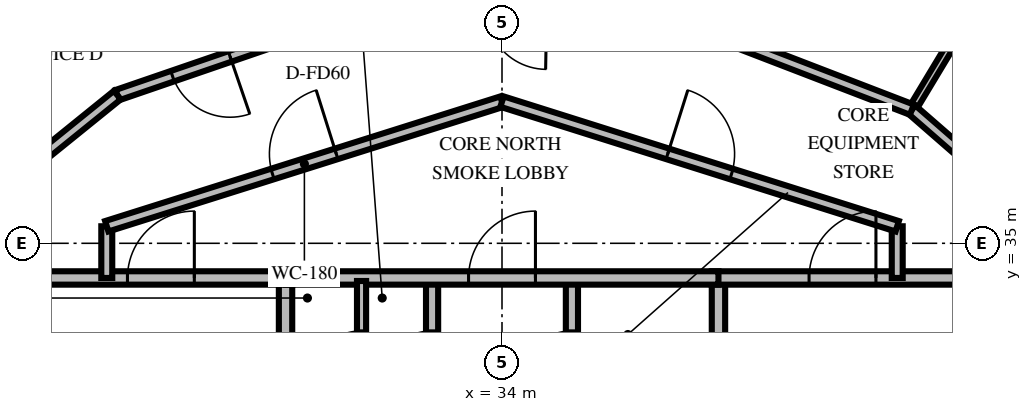
"""IFC4 building model, lengths in metres.
Left out: names, types, materials, properties, quantities, classifications, styles, units other than length and angle.
Written with IfcOpenShell. Run it as: python <this file> out.ifc"""

import sys

from ifc_helpers import new_model, si_unit, direction, frame, frame_2d, origin, place, context, subcontext, project, spatial, rectangle, extrude, element, fill, save


model = new_model("IFC4")
c1 = context("Model", 3, precision=1e-05, world=origin(), true_north=direction((0.0, 1.0)))
c2 = subcontext(c1, "Body", "Model", "MODEL_VIEW")
j1 = project(units=[si_unit("LENGTHUNIT", "METRE"), si_unit("PLANEANGLEUNIT", "RADIAN")], contexts=[c1])
p1 = place(None, origin())
s1 = spatial("IfcSite", under=j1, at=p1, CompositionType="ELEMENT")
p2 = place(p1, origin())
s2 = spatial("IfcBuilding", under=s1, at=p2, CompositionType="ELEMENT")
p3 = place(p2, frame((0.0, 0.0, 195.2)))
s3 = spatial("IfcBuildingStorey", under=s2, at=p3, CompositionType="ELEMENT", Elevation=195.2)
p4 = place(p3, frame((30.44, 30.05, 0.0), z_axis=(0.0, 0.0, 1.0), x_axis=(0.0, 1.0, 0.0)))
e1 = element("IfcWall", 1, at=p4, inside=s3, PredefinedType="SOLIDWALL", context=c2, shape_type="SweptSolid", body=[
    extrude(rectangle(XDim=4.38, YDim=0.22, at=frame_2d((2.19, 0.0))), origin(), (0.0, 0.0, 1.0), 2.46),
])
p5 = place(p4, frame((0.8, 0.0, 0.0)))
e2 = element("IfcOpeningElement", 2, at=p5, cuts=e1, PredefinedType="OPENING", context=c2, shape_type="SweptSolid", body=[
    extrude(rectangle(XDim=1.05, YDim=2.1, at=frame_2d((0.525, 1.05))), frame((0.0, 0.12, 0.0), z_axis=(0.0, -1.0, 0.0), x_axis=(1.0, 0.0, 0.0)), (0.0, 0.0, 1.0), 0.24),
])
p6 = place(p3, frame((26.24, 34.43, 0.0), z_axis=(0.0, 0.0, 1.0), x_axis=(1.0, 0.0, 0.0)))
e3 = element("IfcWall", 3, at=p6, inside=s3, PredefinedType="SOLIDWALL", context=c2, shape_type="SweptSolid", body=[
    extrude(rectangle(XDim=4.31, YDim=0.22, at=frame_2d((2.155, 0.0))), origin(), (0.0, 0.0, 1.0), 2.46),
])
p7 = place(p6, frame((1.6, 0.0, 0.0)))
e4 = element("IfcOpeningElement", 4, at=p7, cuts=e3, PredefinedType="OPENING", context=c2, shape_type="SweptSolid", body=[
    extrude(rectangle(XDim=1.1, YDim=2.15, at=frame_2d((0.55, 1.075))), frame((0.0, 0.12, 0.0), z_axis=(0.0, -1.0, 0.0), x_axis=(1.0, 0.0, 0.0)), (0.0, 0.0, 1.0), 0.24),
])
p8 = place(p3, frame((32.85, 30.05, 0.0), z_axis=(0.0, 0.0, 1.0), x_axis=(0.0, 1.0, 0.0)))
e5 = element("IfcWall", 5, at=p8, inside=s3, PredefinedType="SOLIDWALL", context=c2, shape_type="SweptSolid", body=[
    extrude(rectangle(XDim=4.38, YDim=0.2, at=frame_2d((2.19, 0.0))), origin(), (0.0, 0.0, 1.0), 2.46),
])
p9 = place(p8, frame((2.65, 0.0, 0.0)))
e6 = element("IfcOpeningElement", 6, at=p9, cuts=e5, PredefinedType="OPENING", context=c2, shape_type="SweptSolid", body=[
    extrude(rectangle(XDim=0.86, YDim=2.05, at=frame_2d((0.43, 1.025))), frame((0.0, 0.11, 0.0), z_axis=(0.0, -1.0, 0.0), x_axis=(1.0, 0.0, 0.0)), (0.0, 0.0, 1.0), 0.22),
])
p10 = place(p3, frame((37.56, 30.05, 0.0), z_axis=(0.0, 0.0, 1.0), x_axis=(0.0, 1.0, 0.0)))
e7 = element("IfcWall", 7, at=p10, inside=s3, PredefinedType="SOLIDWALL", context=c2, shape_type="SweptSolid", body=[
    extrude(rectangle(XDim=4.38, YDim=0.22, at=frame_2d((2.19, 0.0))), origin(), (0.0, 0.0, 1.0), 2.46),
])
p11 = place(p10, frame((0.8, 0.0, 0.0)))
e8 = element("IfcOpeningElement", 8, at=p11, cuts=e7, PredefinedType="OPENING", context=c2, shape_type="SweptSolid", body=[
    extrude(rectangle(XDim=1.05, YDim=2.1, at=frame_2d((0.525, 1.05))), frame((0.0, 0.12, 0.0), z_axis=(0.0, -1.0, 0.0), x_axis=(1.0, 0.0, 0.0)), (0.0, 0.0, 1.0), 0.24),
])
p12 = place(p3, frame((37.45, 34.43, 0.0), z_axis=(0.0, 0.0, 1.0), x_axis=(1.0, 0.0, 0.0)))
e9 = element("IfcWall", 9, at=p12, inside=s3, PredefinedType="SOLIDWALL", context=c2, shape_type="SweptSolid", body=[
    extrude(rectangle(XDim=4.31, YDim=0.22, at=frame_2d((2.155, 0.0))), origin(), (0.0, 0.0, 1.0), 2.46),
])
p13 = place(p12, frame((1.6, 0.0, 0.0)))
e10 = element("IfcOpeningElement", 10, at=p13, cuts=e9, PredefinedType="OPENING", context=c2, shape_type="SweptSolid", body=[
    extrude(rectangle(XDim=1.1, YDim=2.15, at=frame_2d((0.55, 1.075))), frame((0.0, 0.12, 0.0), z_axis=(0.0, -1.0, 0.0), x_axis=(1.0, 0.0, 0.0)), (0.0, 0.0, 1.0), 0.24),
])
p14 = place(p3, frame((35.15, 30.05, 0.0), z_axis=(0.0, 0.0, 1.0), x_axis=(0.0, 1.0, 0.0)))
e11 = element("IfcWall", 11, at=p14, inside=s3, PredefinedType="SOLIDWALL", context=c2, shape_type="SweptSolid", body=[
    extrude(rectangle(XDim=4.38, YDim=0.2, at=frame_2d((2.19, 0.0))), origin(), (0.0, 0.0, 1.0), 2.46),
])
p15 = place(p14, frame((2.65, 0.0, 0.0)))
e12 = element("IfcOpeningElement", 12, at=p15, cuts=e11, PredefinedType="OPENING", context=c2, shape_type="SweptSolid", body=[
    extrude(rectangle(XDim=0.86, YDim=2.05, at=frame_2d((0.43, 1.025))), frame((0.0, 0.11, 0.0), z_axis=(0.0, -1.0, 0.0), x_axis=(1.0, 0.0, 0.0)), (0.0, 0.0, 1.0), 0.22),
])
p16 = place(p3, frame((30.44, 34.43, 0.0), z_axis=(0.0, 0.0, 1.0), x_axis=(1.0, 0.0, 0.0)))
e13 = element("IfcWall", 13, at=p16, inside=s3, PredefinedType="SOLIDWALL", context=c2, shape_type="SweptSolid", body=[
    extrude(rectangle(XDim=7.12, YDim=0.22, at=frame_2d((3.56, 0.0))), origin(), (0.0, 0.0, 1.0), 2.46),
])
p17 = place(p16, frame((3.01, 0.0, 0.0)))
e14 = element("IfcOpeningElement", 14, at=p17, cuts=e13, PredefinedType="OPENING", context=c2, shape_type="SweptSolid", body=[
    extrude(rectangle(XDim=1.1, YDim=2.15, at=frame_2d((0.55, 1.075))), frame((0.0, 0.12, 0.0), z_axis=(0.0, -1.0, 0.0), x_axis=(1.0, 0.0, 0.0)), (0.0, 0.0, 1.0), 0.24),
])
p18 = place(p3, frame((31.69, 32.05, 0.0), z_axis=(0.0, 0.0, 1.0), x_axis=(0.0, 1.0, 0.0)))
e15 = element("IfcWall", 15, at=p18, inside=s3, PredefinedType="PARTITIONING", context=c2, shape_type="SweptSolid", body=[
    extrude(rectangle(XDim=2.33, YDim=0.15, at=frame_2d((1.165, 0.0))), origin(), (0.0, 0.0, 1.0), 2.46),
])
p19 = place(p18, frame((0.65, 0.0, 0.0)))
e16 = element("IfcOpeningElement", 16, at=p19, cuts=e15, PredefinedType="OPENING", context=c2, shape_type="SweptSolid", body=[
    extrude(rectangle(XDim=0.86, YDim=2.05, at=frame_2d((0.43, 1.025))), frame((0.0, 0.085, 0.0), z_axis=(0.0, -1.0, 0.0), x_axis=(1.0, 0.0, 0.0)), (0.0, 0.0, 1.0), 0.17),
])
for number, where, z_axis, x_axis in (
    (17, (27.5, 34.43, 0.0), (0.0, 0.0, 1.0), (0.0, 1.0, 0.0)),
    (18, (40.5, 35.28, 0.0), (0.0, 0.0, 1.0), (0.0, -1.0, 0.0)),
):
    element("IfcWall", number, at=place(p3, frame(where, z_axis=z_axis, x_axis=x_axis)), inside=s3, PredefinedType="PARTITIONING", context=c2, shape_type="SweptSolid", body=[
        extrude(rectangle(XDim=0.85, YDim=0.18, at=frame_2d((0.425, 0.0))), origin(), (0.0, 0.0, 1.0), 2.46),
    ])
p20 = place(p3, frame((27.5, 35.28, 0.0), z_axis=(0.0, 0.0, 1.0), x_axis=(0.953691418528, 0.300786765376, 0.0)))
e19 = element("IfcWall", 19, at=p20, inside=s3, PredefinedType="PARTITIONING", context=c2, shape_type="SweptSolid", body=[
    extrude(rectangle(XDim=6.816, YDim=0.18, at=frame_2d((3.408, 0.0))), origin(), (0.0, 0.0, 1.0), 2.46),
])
p21 = place(p20, frame((2.858, 0.0, 0.0)))
e20 = element("IfcOpeningElement", 20, at=p21, cuts=e19, PredefinedType="OPENING", context=c2, shape_type="SweptSolid", body=[
    extrude(rectangle(XDim=1.1, YDim=2.15, at=frame_2d((0.55, 1.075))), frame((0.0, 0.1, 0.0), z_axis=(0.0, -1.0, 0.0), x_axis=(1.0, 0.0, 0.0)), (0.0, 0.0, 1.0), 0.2),
])
p22 = place(p3, frame((34.0, 37.33, 0.0), z_axis=(0.0, 0.0, 1.0), x_axis=(0.953691418528, -0.300786765376, 0.0)))
e21 = element("IfcWall", 21, at=p22, inside=s3, PredefinedType="PARTITIONING", context=c2, shape_type="SweptSolid", body=[
    extrude(rectangle(XDim=6.816, YDim=0.18, at=frame_2d((3.408, 0.0))), origin(), (0.0, 0.0, 1.0), 2.46),
])
p23 = place(p22, frame((2.858, 0.0, 0.0)))
e22 = element("IfcOpeningElement", 22, at=p23, cuts=e21, PredefinedType="OPENING", context=c2, shape_type="SweptSolid", body=[
    extrude(rectangle(XDim=1.1, YDim=2.15, at=frame_2d((0.55, 1.075))), frame((0.0, 0.1, 0.0), z_axis=(0.0, -1.0, 0.0), x_axis=(1.0, 0.0, 0.0)), (0.0, 0.0, 1.0), 0.2),
])
p24 = place(p3, frame((40.741, 37.197, 0.0), z_axis=(0.0, 0.0, 1.0), x_axis=(0.515795335876, 0.856711836903, 0.0)))
e23 = element("IfcWall", 23, at=p24, inside=s3, PredefinedType="PARTITIONING", context=c2, shape_type="SweptSolid", body=[
    extrude(rectangle(XDim=9.417, YDim=0.125, at=frame_2d((4.708, 0.0))), origin(), (0.0, 0.0, 1.0), 2.46),
])
p25 = place(p3, frame((44.165, 34.216, 0.0), z_axis=(0.0, 0.0, 1.0), x_axis=(-0.754153769573, 0.656697869525, 0.0)))
e24 = element("IfcWall", 24, at=p25, inside=s3, PredefinedType="PARTITIONING", context=c2, shape_type="SweptSolid", body=[
    extrude(rectangle(XDim=4.539, YDim=0.18, at=frame_2d((2.27, 0.0))), origin(), (0.0, 0.0, 1.0), 2.46),
])
p26 = place(p25, frame((0.96, 0.0, 0.0)))
e25 = element("IfcOpeningElement", 25, at=p26, cuts=e24, PredefinedType="OPENING", context=c2, shape_type="SweptSolid", body=[
    extrude(rectangle(XDim=1.0, YDim=2.15, at=frame_2d((0.5, 1.075))), frame((0.0, 0.1, 0.0), z_axis=(0.0, -1.0, 0.0), x_axis=(1.0, 0.0, 0.0)), (0.0, 0.0, 1.0), 0.2),
])
p27 = place(p3, frame((40.741, 37.197, 0.0), z_axis=(0.0, 0.0, 1.0), x_axis=(-0.93326379198, 0.359191723984, 0.0)))
e26 = element("IfcWall", 26, at=p27, inside=s3, PredefinedType="PARTITIONING", context=c2, shape_type="SweptSolid", body=[
    extrude(rectangle(XDim=4.539, YDim=0.18, at=frame_2d((2.27, 0.0))), origin(), (0.0, 0.0, 1.0), 2.46),
])
p28 = place(p3, frame((31.967, 38.911, 0.0), z_axis=(0.0, 0.0, 1.0), x_axis=(-0.945799700753, -0.324750559747, 0.0)))
e27 = element("IfcWall", 27, at=p28, inside=s3, PredefinedType="PARTITIONING", context=c2, shape_type="SweptSolid", body=[
    extrude(rectangle(XDim=4.539, YDim=0.18, at=frame_2d((2.27, 0.0))), origin(), (0.0, 0.0, 1.0), 2.46),
])
p29 = place(p28, frame((2.579, 0.0, 0.0)))
e28 = element("IfcOpeningElement", 28, at=p29, cuts=e27, PredefinedType="OPENING", context=c2, shape_type="SweptSolid", body=[
    extrude(rectangle(XDim=1.0, YDim=2.15, at=frame_2d((0.5, 1.075))), frame((0.0, 0.1, 0.0), z_axis=(0.0, -1.0, 0.0), x_axis=(1.0, 0.0, 0.0)), (0.0, 0.0, 1.0), 0.2),
])
p30 = place(p3, frame((27.674, 37.437, 0.0), z_axis=(0.0, 0.0, 1.0), x_axis=(-0.777710585506, -0.62862249816, 0.0)))
e29 = element("IfcWall", 29, at=p30, inside=s3, PredefinedType="PARTITIONING", context=c2, shape_type="SweptSolid", body=[
    extrude(rectangle(XDim=4.539, YDim=0.18, at=frame_2d((2.27, 0.0))), origin(), (0.0, 0.0, 1.0), 2.46),
])
p31 = place(p7, origin())
e30 = element("IfcDoor", 30, at=p31, inside=s3, OperationType="SINGLE_SWING_RIGHT", PredefinedType="DOOR", context=c2, shape_type="SweptSolid", body=[
    extrude(rectangle(XDim=1.1, YDim=2.15, at=frame_2d((0.55, 1.075))), frame((0.0, 0.025, 0.0), z_axis=(0.0, -1.0, 0.0), x_axis=(1.0, 0.0, 0.0)), (0.0, 0.0, 1.0), 0.05),
])
fill(e4, e30)
p32 = place(p9, origin())
e31 = element("IfcDoor", 31, at=p32, inside=s3, OperationType="SINGLE_SWING_LEFT", PredefinedType="TRAPDOOR", context=c2, shape_type="SweptSolid", body=[
    extrude(rectangle(XDim=0.86, YDim=2.05, at=frame_2d((0.43, 1.025))), frame((0.0, 0.025, 0.0), z_axis=(0.0, -1.0, 0.0), x_axis=(1.0, 0.0, 0.0)), (0.0, 0.0, 1.0), 0.05),
])
fill(e6, e31)
p33 = place(p13, origin())
e32 = element("IfcDoor", 32, at=p33, inside=s3, OperationType="SINGLE_SWING_RIGHT", PredefinedType="DOOR", context=c2, shape_type="SweptSolid", body=[
    extrude(rectangle(XDim=1.1, YDim=2.15, at=frame_2d((0.55, 1.075))), frame((0.0, 0.025, 0.0), z_axis=(0.0, -1.0, 0.0), x_axis=(1.0, 0.0, 0.0)), (0.0, 0.0, 1.0), 0.05),
])
fill(e10, e32)
p34 = place(p15, origin())
e33 = element("IfcDoor", 33, at=p34, inside=s3, OperationType="SINGLE_SWING_LEFT", PredefinedType="TRAPDOOR", context=c2, shape_type="SweptSolid", body=[
    extrude(rectangle(XDim=0.86, YDim=2.05, at=frame_2d((0.43, 1.025))), frame((0.0, 0.025, 0.0), z_axis=(0.0, -1.0, 0.0), x_axis=(1.0, 0.0, 0.0)), (0.0, 0.0, 1.0), 0.05),
])
fill(e12, e33)
p35 = place(p17, origin())
e34 = element("IfcDoor", 34, at=p35, inside=s3, OperationType="SINGLE_SWING_RIGHT", PredefinedType="DOOR", context=c2, shape_type="SweptSolid", body=[
    extrude(rectangle(XDim=1.1, YDim=2.15, at=frame_2d((0.55, 1.075))), frame((0.0, 0.025, 0.0), z_axis=(0.0, -1.0, 0.0), x_axis=(1.0, 0.0, 0.0)), (0.0, 0.0, 1.0), 0.05),
])
fill(e14, e34)
p36 = place(p19, origin())
e35 = element("IfcDoor", 35, at=p36, inside=s3, OperationType="SINGLE_SWING_LEFT", PredefinedType="TRAPDOOR", context=c2, shape_type="SweptSolid", body=[
    extrude(rectangle(XDim=0.86, YDim=2.05, at=frame_2d((0.43, 1.025))), frame((0.0, 0.025, 0.0), z_axis=(0.0, -1.0, 0.0), x_axis=(1.0, 0.0, 0.0)), (0.0, 0.0, 1.0), 0.05),
])
fill(e16, e35)
p37 = place(p21, origin())
e36 = element("IfcDoor", 36, at=p37, inside=s3, OperationType="SINGLE_SWING_RIGHT", PredefinedType="DOOR", context=c2, shape_type="SweptSolid", body=[
    extrude(rectangle(XDim=1.1, YDim=2.15, at=frame_2d((0.55, 1.075))), frame((0.0, 0.025, 0.0), z_axis=(0.0, -1.0, 0.0), x_axis=(1.0, 0.0, 0.0)), (0.0, 0.0, 1.0), 0.05),
])
fill(e20, e36)
p38 = place(p23, origin())
e37 = element("IfcDoor", 37, at=p38, inside=s3, OperationType="SINGLE_SWING_LEFT", PredefinedType="DOOR", context=c2, shape_type="SweptSolid", body=[
    extrude(rectangle(XDim=1.1, YDim=2.15, at=frame_2d((0.55, 1.075))), frame((0.0, 0.025, 0.0), z_axis=(0.0, -1.0, 0.0), x_axis=(1.0, 0.0, 0.0)), (0.0, 0.0, 1.0), 0.05),
])
fill(e22, e37)
p39 = place(p29, origin())
e38 = element("IfcDoor", 38, at=p39, inside=s3, OperationType="SINGLE_SWING_LEFT", PredefinedType="DOOR", context=c2, shape_type="SweptSolid", body=[
    extrude(rectangle(XDim=1.0, YDim=2.15, at=frame_2d((0.5, 1.075))), frame((0.0, 0.025, 0.0), z_axis=(0.0, -1.0, 0.0), x_axis=(1.0, 0.0, 0.0)), (0.0, 0.0, 1.0), 0.05),
])
fill(e28, e38)
save(model, sys.argv[1])
